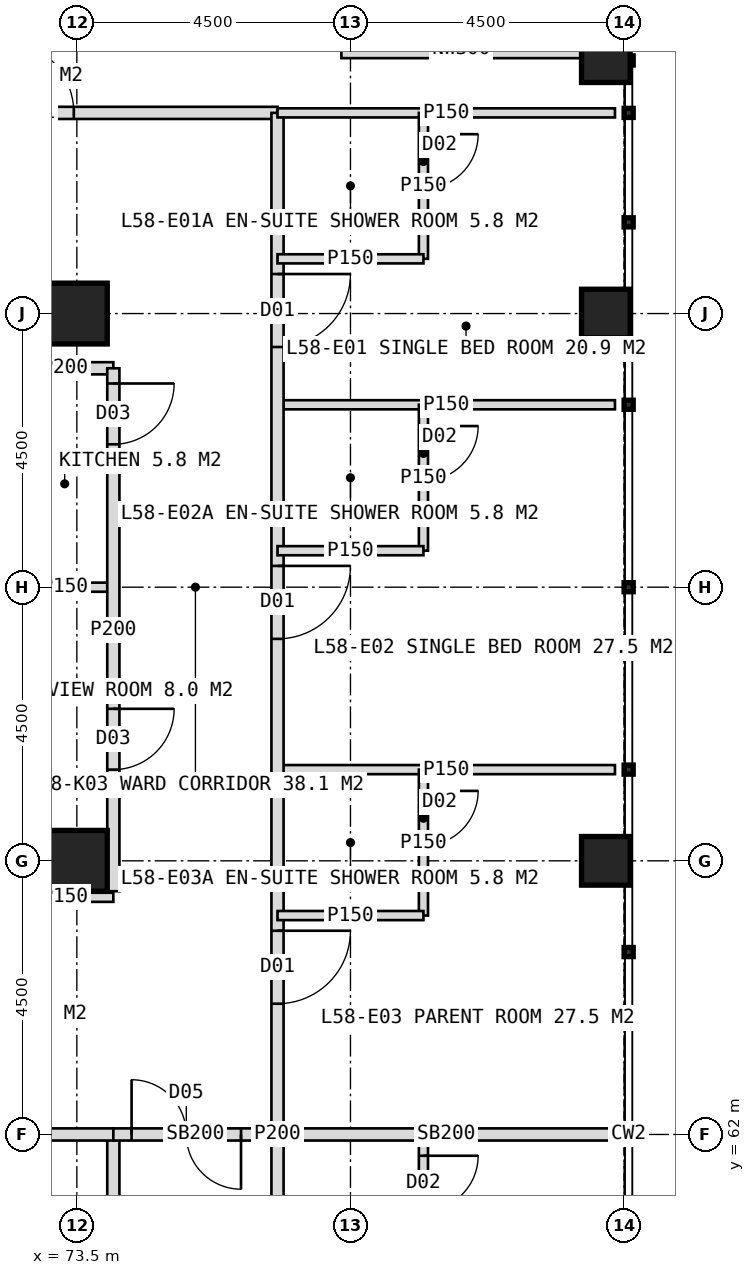
"""IFC4 building model, lengths in metres.
Left out: names, types, materials, properties, quantities, classifications, styles, units other than length and angle.
Written with IfcOpenShell. Run it as: python <this file> out.ifc"""

import sys

from ifc_helpers import new_model, si_unit, direction, frame, frame_2d, origin, origin_2d, place, context, subcontext, project, spatial, rectangle, hollow_rectangle, extrude, element, fill, save


model = new_model("IFC4")
c1 = context("Model", 3, precision=1e-05, world=origin(), true_north=direction((0.0, 1.0)))
c2 = subcontext(c1, "Body", "Model", "MODEL_VIEW")
j1 = project(units=[si_unit("LENGTHUNIT", "METRE"), si_unit("PLANEANGLEUNIT", "RADIAN")], contexts=[c1])
p1 = place(None, origin())
s1 = spatial("IfcSite", under=j1, at=p1, CompositionType="ELEMENT")
p2 = place(p1, origin())
s2 = spatial("IfcBuilding", under=s1, at=p2, CompositionType="ELEMENT")
p3 = place(p2, frame((0.0, 0.0, 241.0)))
s3 = spatial("IfcBuildingStorey", under=s2, at=p3, CompositionType="ELEMENT", Elevation=241.0)
for number, where, z_axis, x_axis in (
    (1, (73.5, 75.5, 0.0), (0.0, 0.0, 1.0), (1.0, 0.0, 0.0)),
    (2, (73.5, 66.5, 0.0), (0.0, 0.0, 1.0), (1.0, 0.0, 0.0)),
):
    element("IfcColumn", number, at=place(p3, frame(where, z_axis=z_axis, x_axis=x_axis)), inside=s3, PredefinedType="COLUMN", context=c2, shape_type="SweptSolid", body=[
        extrude(hollow_rectangle(XDim=1.0, YDim=1.0, WallThickness=0.1, at=origin_2d()), origin(), (0.0, 0.0, 1.0), 4.0),
    ])
for number, where, z_axis, x_axis in (
    (3, (82.2, 66.5, 0.0), (0.0, 0.0, 1.0), (1.0, 0.0, 0.0)),
    (4, (82.2, 75.5, 0.0), (0.0, 0.0, 1.0), (1.0, 0.0, 0.0)),
    (5, (82.2, 79.7, 0.0), (0.0, 0.0, 1.0), (1.0, 0.0, 0.0)),
):
    element("IfcColumn", number, at=place(p3, frame(where, z_axis=z_axis, x_axis=x_axis)), inside=s3, PredefinedType="COLUMN", context=c2, shape_type="SweptSolid", body=[
        extrude(hollow_rectangle(XDim=0.8, YDim=0.8, WallThickness=0.08, at=origin_2d()), origin(), (0.0, 0.0, 1.0), 4.0),
    ])
p4 = place(p3, frame((77.85, 79.85, 0.0), z_axis=(0.0, 0.0, 1.0), x_axis=(1.0, 0.0, 0.0)))
e6 = element("IfcWall", 6, at=p4, inside=s3, PredefinedType="ELEMENTEDWALL", context=c2, shape_type="SweptSolid", body=[
    extrude(rectangle(XDim=3.95, YDim=0.3, at=frame_2d((1.975, 0.0))), origin(), (0.0, 0.0, 1.0), 2.95),
])
p5 = place(p3, frame((43.2, 78.8, 0.0), z_axis=(0.0, 0.0, 1.0), x_axis=(1.0, 0.0, 0.0)))
e7 = element("IfcWall", 7, at=p5, inside=s3, PredefinedType="PARTITIONING", context=c2, shape_type="SweptSolid", body=[
    extrude(rectangle(XDim=33.6, YDim=0.2, at=frame_2d((16.8, 0.0))), origin(), (0.0, 0.0, 1.0), 3.75),
])
p6 = place(p5, frame((3.4, 0.0, 0.0)))
e8 = element("IfcOpeningElement", 8, at=p6, cuts=e7, PredefinedType="OPENING", context=c2, shape_type="SweptSolid", body=[
    extrude(rectangle(XDim=1.0, YDim=2.1, at=frame_2d((0.5, 1.05))), frame((0.0, 0.11, 0.0), z_axis=(0.0, -1.0, 0.0), x_axis=(1.0, 0.0, 0.0)), (0.0, 0.0, 1.0), 0.22),
])
p7 = place(p5, frame((11.05, 0.0, 0.0)))
e9 = element("IfcOpeningElement", 9, at=p7, cuts=e7, PredefinedType="OPENING", context=c2, shape_type="SweptSolid", body=[
    extrude(rectangle(XDim=1.2, YDim=2.2, at=frame_2d((0.6, 1.1))), frame((0.0, 0.11, 0.0), z_axis=(0.0, -1.0, 0.0), x_axis=(1.0, 0.0, 0.0)), (0.0, 0.0, 1.0), 0.22),
])
p8 = place(p5, frame((20.05, 0.0, 0.0)))
e10 = element("IfcOpeningElement", 10, at=p8, cuts=e7, PredefinedType="OPENING", context=c2, shape_type="SweptSolid", body=[
    extrude(rectangle(XDim=1.2, YDim=2.2, at=frame_2d((0.6, 1.1))), frame((0.0, 0.11, 0.0), z_axis=(0.0, -1.0, 0.0), x_axis=(1.0, 0.0, 0.0)), (0.0, 0.0, 1.0), 0.22),
])
p9 = place(p5, frame((29.05, 0.0, 0.0)))
e11 = element("IfcOpeningElement", 11, at=p9, cuts=e7, PredefinedType="OPENING", context=c2, shape_type="SweptSolid", body=[
    extrude(rectangle(XDim=1.2, YDim=2.2, at=frame_2d((0.6, 1.1))), frame((0.0, 0.11, 0.0), z_axis=(0.0, -1.0, 0.0), x_axis=(1.0, 0.0, 0.0)), (0.0, 0.0, 1.0), 0.22),
])
p10 = place(p3, frame((72.5, 74.6, 0.0), z_axis=(0.0, 0.0, 1.0), x_axis=(1.0, 0.0, 0.0)))
e12 = element("IfcWall", 12, at=p10, inside=s3, PredefinedType="PARTITIONING", context=c2, shape_type="SweptSolid", body=[
    extrude(rectangle(XDim=1.6, YDim=0.2, at=frame_2d((0.8, 0.0))), origin(), (0.0, 0.0, 1.0), 3.75),
])
for number, where, z_axis, x_axis in (
    (13, (76.8, 74.0, 0.0), (0.0, 0.0, 1.0), (1.0, 0.0, 0.0)),
    (14, (76.8, 68.0, 0.0), (0.0, 0.0, 1.0), (1.0, 0.0, 0.0)),
):
    element("IfcWall", number, at=place(p3, frame(where, z_axis=z_axis, x_axis=x_axis)), inside=s3, PredefinedType="PARTITIONING", context=c2, shape_type="SweptSolid", body=[
        extrude(rectangle(XDim=5.55, YDim=0.15, at=frame_2d((2.775, 0.0))), origin(), (0.0, 0.0, 1.0), 3.75),
    ])
p11 = place(p3, frame((76.8, 62.0, 0.0), z_axis=(0.0, 0.0, 1.0), x_axis=(1.0, 0.0, 0.0)))
e15 = element("IfcWall", 15, at=p11, inside=s3, PredefinedType="SOLIDWALL", context=c2, shape_type="SweptSolid", body=[
    extrude(rectangle(XDim=5.55, YDim=0.2, at=frame_2d((2.775, 0.0))), origin(), (0.0, 0.0, 1.0), 2.95),
])
p12 = place(p3, frame((76.8, 78.8, 0.0), z_axis=(0.0, 0.0, 1.0), x_axis=(0.0, -1.0, 0.0)))
e16 = element("IfcWall", 16, at=p12, inside=s3, PredefinedType="PARTITIONING", context=c2, shape_type="SweptSolid", body=[
    extrude(rectangle(XDim=33.6, YDim=0.2, at=frame_2d((16.8, 0.0))), origin(), (0.0, 0.0, 1.0), 3.75),
])
p13 = place(p12, frame((2.65, 0.0, 0.0)))
e17 = element("IfcOpeningElement", 17, at=p13, cuts=e16, PredefinedType="OPENING", context=c2, shape_type="SweptSolid", body=[
    extrude(rectangle(XDim=1.2, YDim=2.2, at=frame_2d((0.6, 1.1))), frame((0.0, 0.11, 0.0), z_axis=(0.0, -1.0, 0.0), x_axis=(1.0, 0.0, 0.0)), (0.0, 0.0, 1.0), 0.22),
])
p14 = place(p12, frame((7.45, 0.0, 0.0)))
e18 = element("IfcOpeningElement", 18, at=p14, cuts=e16, PredefinedType="OPENING", context=c2, shape_type="SweptSolid", body=[
    extrude(rectangle(XDim=1.2, YDim=2.2, at=frame_2d((0.6, 1.1))), frame((0.0, 0.11, 0.0), z_axis=(0.0, -1.0, 0.0), x_axis=(1.0, 0.0, 0.0)), (0.0, 0.0, 1.0), 0.22),
])
p15 = place(p12, frame((13.45, 0.0, 0.0)))
e19 = element("IfcOpeningElement", 19, at=p15, cuts=e16, PredefinedType="OPENING", context=c2, shape_type="SweptSolid", body=[
    extrude(rectangle(XDim=1.2, YDim=2.2, at=frame_2d((0.6, 1.1))), frame((0.0, 0.11, 0.0), z_axis=(0.0, -1.0, 0.0), x_axis=(1.0, 0.0, 0.0)), (0.0, 0.0, 1.0), 0.22),
])
p16 = place(p12, frame((20.05, 0.0, 0.0)))
e20 = element("IfcOpeningElement", 20, at=p16, cuts=e16, PredefinedType="OPENING", context=c2, shape_type="SweptSolid", body=[
    extrude(rectangle(XDim=1.2, YDim=2.2, at=frame_2d((0.6, 1.1))), frame((0.0, 0.11, 0.0), z_axis=(0.0, -1.0, 0.0), x_axis=(1.0, 0.0, 0.0)), (0.0, 0.0, 1.0), 0.22),
])
p17 = place(p12, frame((29.05, 0.0, 0.0)))
e21 = element("IfcOpeningElement", 21, at=p17, cuts=e16, PredefinedType="OPENING", context=c2, shape_type="SweptSolid", body=[
    extrude(rectangle(XDim=1.2, YDim=2.2, at=frame_2d((0.6, 1.1))), frame((0.0, 0.11, 0.0), z_axis=(0.0, -1.0, 0.0), x_axis=(1.0, 0.0, 0.0)), (0.0, 0.0, 1.0), 0.22),
])
p18 = place(p3, frame((76.8, 78.8, 0.0), z_axis=(0.0, 0.0, 1.0), x_axis=(1.0, 0.0, 0.0)))
e22 = element("IfcWall", 22, at=p18, inside=s3, PredefinedType="PARTITIONING", context=c2, shape_type="SweptSolid", body=[
    extrude(rectangle(XDim=5.55, YDim=0.15, at=frame_2d((2.775, 0.0))), origin(), (0.0, 0.0, 1.0), 3.75),
])
p19 = place(p3, frame((79.2, 78.8, 0.0), z_axis=(0.0, 0.0, 1.0), x_axis=(0.0, -1.0, 0.0)))
e23 = element("IfcWall", 23, at=p19, inside=s3, PredefinedType="PARTITIONING", context=c2, shape_type="SweptSolid", body=[
    extrude(rectangle(XDim=2.4, YDim=0.15, at=frame_2d((1.2, 0.0))), origin(), (0.0, 0.0, 1.0), 3.75),
])
p20 = place(p19, frame((0.35, 0.0, 0.0)))
e24 = element("IfcOpeningElement", 24, at=p20, cuts=e23, PredefinedType="OPENING", context=c2, shape_type="SweptSolid", body=[
    extrude(rectangle(XDim=0.9, YDim=2.1, at=frame_2d((0.45, 1.05))), frame((0.0, 0.085, 0.0), z_axis=(0.0, -1.0, 0.0), x_axis=(1.0, 0.0, 0.0)), (0.0, 0.0, 1.0), 0.17),
])
p21 = place(p3, frame((76.8, 76.4, 0.0), z_axis=(0.0, 0.0, 1.0), x_axis=(1.0, 0.0, 0.0)))
e25 = element("IfcWall", 25, at=p21, inside=s3, PredefinedType="PARTITIONING", context=c2, shape_type="SweptSolid", body=[
    extrude(rectangle(XDim=2.4, YDim=0.15, at=frame_2d((1.2, 0.0))), origin(), (0.0, 0.0, 1.0), 3.75),
])
p22 = place(p3, frame((79.2, 74.0, 0.0), z_axis=(0.0, 0.0, 1.0), x_axis=(0.0, -1.0, 0.0)))
e26 = element("IfcWall", 26, at=p22, inside=s3, PredefinedType="PARTITIONING", context=c2, shape_type="SweptSolid", body=[
    extrude(rectangle(XDim=2.4, YDim=0.15, at=frame_2d((1.2, 0.0))), origin(), (0.0, 0.0, 1.0), 3.75),
])
p23 = place(p22, frame((0.35, 0.0, 0.0)))
e27 = element("IfcOpeningElement", 27, at=p23, cuts=e26, PredefinedType="OPENING", context=c2, shape_type="SweptSolid", body=[
    extrude(rectangle(XDim=0.9, YDim=2.1, at=frame_2d((0.45, 1.05))), frame((0.0, 0.085, 0.0), z_axis=(0.0, -1.0, 0.0), x_axis=(1.0, 0.0, 0.0)), (0.0, 0.0, 1.0), 0.17),
])
p24 = place(p3, frame((76.8, 71.6, 0.0), z_axis=(0.0, 0.0, 1.0), x_axis=(1.0, 0.0, 0.0)))
e28 = element("IfcWall", 28, at=p24, inside=s3, PredefinedType="PARTITIONING", context=c2, shape_type="SweptSolid", body=[
    extrude(rectangle(XDim=2.4, YDim=0.15, at=frame_2d((1.2, 0.0))), origin(), (0.0, 0.0, 1.0), 3.75),
])
p25 = place(p3, frame((79.2, 68.0, 0.0), z_axis=(0.0, 0.0, 1.0), x_axis=(0.0, -1.0, 0.0)))
e29 = element("IfcWall", 29, at=p25, inside=s3, PredefinedType="PARTITIONING", context=c2, shape_type="SweptSolid", body=[
    extrude(rectangle(XDim=2.4, YDim=0.15, at=frame_2d((1.2, 0.0))), origin(), (0.0, 0.0, 1.0), 3.75),
])
p26 = place(p25, frame((0.35, 0.0, 0.0)))
e30 = element("IfcOpeningElement", 30, at=p26, cuts=e29, PredefinedType="OPENING", context=c2, shape_type="SweptSolid", body=[
    extrude(rectangle(XDim=0.9, YDim=2.1, at=frame_2d((0.45, 1.05))), frame((0.0, 0.085, 0.0), z_axis=(0.0, -1.0, 0.0), x_axis=(1.0, 0.0, 0.0)), (0.0, 0.0, 1.0), 0.17),
])
p27 = place(p3, frame((76.8, 65.6, 0.0), z_axis=(0.0, 0.0, 1.0), x_axis=(1.0, 0.0, 0.0)))
e31 = element("IfcWall", 31, at=p27, inside=s3, PredefinedType="PARTITIONING", context=c2, shape_type="SweptSolid", body=[
    extrude(rectangle(XDim=2.4, YDim=0.15, at=frame_2d((1.2, 0.0))), origin(), (0.0, 0.0, 1.0), 3.75),
])
p28 = place(p3, frame((79.2, 62.0, 0.0), z_axis=(0.0, 0.0, 1.0), x_axis=(0.0, -1.0, 0.0)))
e32 = element("IfcWall", 32, at=p28, inside=s3, PredefinedType="PARTITIONING", context=c2, shape_type="SweptSolid", body=[
    extrude(rectangle(XDim=3.0, YDim=0.15, at=frame_2d((1.5, 0.0))), origin(), (0.0, 0.0, 1.0), 3.75),
])
p29 = place(p28, frame((0.35, 0.0, 0.0)))
e33 = element("IfcOpeningElement", 33, at=p29, cuts=e32, PredefinedType="OPENING", context=c2, shape_type="SweptSolid", body=[
    extrude(rectangle(XDim=0.9, YDim=2.1, at=frame_2d((0.45, 1.05))), frame((0.0, 0.085, 0.0), z_axis=(0.0, -1.0, 0.0), x_axis=(1.0, 0.0, 0.0)), (0.0, 0.0, 1.0), 0.17),
])
p30 = place(p3, frame((72.5, 71.0, 0.0), z_axis=(0.0, 0.0, 1.0), x_axis=(1.0, 0.0, 0.0)))
e34 = element("IfcWall", 34, at=p30, inside=s3, PredefinedType="PARTITIONING", context=c2, shape_type="SweptSolid", body=[
    extrude(rectangle(XDim=1.6, YDim=0.15, at=frame_2d((0.8, 0.0))), origin(), (0.0, 0.0, 1.0), 3.75),
])
p31 = place(p3, frame((74.1, 74.6, 0.0), z_axis=(0.0, 0.0, 1.0), x_axis=(0.0, -1.0, 0.0)))
e35 = element("IfcWall", 35, at=p31, inside=s3, PredefinedType="PARTITIONING", context=c2, shape_type="SweptSolid", body=[
    extrude(rectangle(XDim=8.6, YDim=0.2, at=frame_2d((4.3, 0.0))), origin(), (0.0, 0.0, 1.0), 3.75),
])
p32 = place(p31, frame((0.25, 0.0, 0.0)))
e36 = element("IfcOpeningElement", 36, at=p32, cuts=e35, PredefinedType="OPENING", context=c2, shape_type="SweptSolid", body=[
    extrude(rectangle(XDim=1.0, YDim=2.1, at=frame_2d((0.5, 1.05))), frame((0.0, 0.11, 0.0), z_axis=(0.0, -1.0, 0.0), x_axis=(1.0, 0.0, 0.0)), (0.0, 0.0, 1.0), 0.22),
])
p33 = place(p31, frame((5.6, 0.0, 0.0)))
e37 = element("IfcOpeningElement", 37, at=p33, cuts=e35, PredefinedType="OPENING", context=c2, shape_type="SweptSolid", body=[
    extrude(rectangle(XDim=1.0, YDim=2.1, at=frame_2d((0.5, 1.05))), frame((0.0, 0.11, 0.0), z_axis=(0.0, -1.0, 0.0), x_axis=(1.0, 0.0, 0.0)), (0.0, 0.0, 1.0), 0.22),
])
p34 = place(p3, frame((74.1, 62.0, 0.0), z_axis=(0.0, 0.0, 1.0), x_axis=(0.0, -1.0, 0.0)))
e38 = element("IfcWall", 38, at=p34, inside=s3, PredefinedType="PARTITIONING", context=c2, shape_type="SweptSolid", body=[
    extrude(rectangle(XDim=14.1, YDim=0.2, at=frame_2d((7.05, 0.0))), origin(), (0.0, 0.0, 1.0), 3.75),
])
p35 = place(p34, frame((2.5, 0.0, 0.0)))
e39 = element("IfcOpeningElement", 39, at=p35, cuts=e38, PredefinedType="OPENING", context=c2, shape_type="SweptSolid", body=[
    extrude(rectangle(XDim=1.0, YDim=2.1, at=frame_2d((0.5, 1.05))), frame((0.0, 0.11, 0.0), z_axis=(0.0, -1.0, 0.0), x_axis=(1.0, 0.0, 0.0)), (0.0, 0.0, 1.0), 0.22),
])
p36 = place(p34, frame((7.0, 0.0, 0.0)))
e40 = element("IfcOpeningElement", 40, at=p36, cuts=e38, PredefinedType="OPENING", context=c2, shape_type="SweptSolid", body=[
    extrude(rectangle(XDim=1.0, YDim=2.1, at=frame_2d((0.5, 1.05))), frame((0.0, 0.11, 0.0), z_axis=(0.0, -1.0, 0.0), x_axis=(1.0, 0.0, 0.0)), (0.0, 0.0, 1.0), 0.22),
])
p37 = place(p34, frame((11.05, 0.0, 0.0)))
e41 = element("IfcOpeningElement", 41, at=p37, cuts=e38, PredefinedType="OPENING", context=c2, shape_type="SweptSolid", body=[
    extrude(rectangle(XDim=1.0, YDim=2.1, at=frame_2d((0.5, 1.05))), frame((0.0, 0.11, 0.0), z_axis=(0.0, -1.0, 0.0), x_axis=(1.0, 0.0, 0.0)), (0.0, 0.0, 1.0), 0.22),
])
p38 = place(p3, frame((72.5, 65.9, 0.0), z_axis=(0.0, 0.0, 1.0), x_axis=(1.0, 0.0, 0.0)))
e42 = element("IfcWall", 42, at=p38, inside=s3, PredefinedType="PARTITIONING", context=c2, shape_type="SweptSolid", body=[
    extrude(rectangle(XDim=1.6, YDim=0.15, at=frame_2d((0.8, 0.0))), origin(), (0.0, 0.0, 1.0), 3.75),
])
p39 = place(p3, frame((69.0, 62.0, 0.0), z_axis=(0.0, 0.0, 1.0), x_axis=(1.0, 0.0, 0.0)))
e43 = element("IfcWall", 43, at=p39, inside=s3, PredefinedType="SOLIDWALL", context=c2, shape_type="SweptSolid", body=[
    extrude(rectangle(XDim=5.1, YDim=0.2, at=frame_2d((2.55, 0.0))), origin(), (0.0, 0.0, 1.0), 2.95),
])
p40 = place(p3, frame((74.1, 62.0, 0.0), z_axis=(0.0, 0.0, 1.0), x_axis=(1.0, 0.0, 0.0)))
e44 = element("IfcWall", 44, at=p40, inside=s3, PredefinedType="SOLIDWALL", context=c2, shape_type="SweptSolid", body=[
    extrude(rectangle(XDim=2.7, YDim=0.2, at=frame_2d((1.35, 0.0))), origin(), (0.0, 0.0, 1.0), 2.95),
])
p41 = place(p40, frame((0.3, 0.0, 0.0)))
e45 = element("IfcOpeningElement", 45, at=p41, cuts=e44, PredefinedType="OPENING", context=c2, shape_type="SweptSolid", body=[
    extrude(rectangle(XDim=1.8, YDim=2.2, at=frame_2d((0.9, 1.1))), frame((0.0, 0.11, 0.0), z_axis=(0.0, -1.0, 0.0), x_axis=(1.0, 0.0, 0.0)), (0.0, 0.0, 1.0), 0.22),
])
p42 = place(p9, origin())
e46 = element("IfcDoor", 46, at=p42, inside=s3, OperationType="SINGLE_SWING_LEFT", PredefinedType="DOOR", context=c2, shape_type="SweptSolid", body=[
    extrude(rectangle(XDim=1.2, YDim=2.2, at=frame_2d((0.6, 1.1))), frame((0.0, 0.025, 0.0), z_axis=(0.0, -1.0, 0.0), x_axis=(1.0, 0.0, 0.0)), (0.0, 0.0, 1.0), 0.05),
])
fill(e11, e46)
p43 = place(p32, origin())
e47 = element("IfcDoor", 47, at=p43, inside=s3, OperationType="SINGLE_SWING_LEFT", PredefinedType="DOOR", context=c2, shape_type="SweptSolid", body=[
    extrude(rectangle(XDim=1.0, YDim=2.1, at=frame_2d((0.5, 1.05))), frame((0.0, 0.025, 0.0), z_axis=(0.0, -1.0, 0.0), x_axis=(1.0, 0.0, 0.0)), (0.0, 0.0, 1.0), 0.05),
])
fill(e36, e47)
p44 = place(p13, origin())
e48 = element("IfcDoor", 48, at=p44, inside=s3, OperationType="SINGLE_SWING_LEFT", PredefinedType="DOOR", context=c2, shape_type="SweptSolid", body=[
    extrude(rectangle(XDim=1.2, YDim=2.2, at=frame_2d((0.6, 1.1))), frame((0.0, 0.025, 0.0), z_axis=(0.0, -1.0, 0.0), x_axis=(1.0, 0.0, 0.0)), (0.0, 0.0, 1.0), 0.05),
])
fill(e17, e48)
p45 = place(p20, origin())
e49 = element("IfcDoor", 49, at=p45, inside=s3, OperationType="SINGLE_SWING_LEFT", PredefinedType="DOOR", context=c2, shape_type="SweptSolid", body=[
    extrude(rectangle(XDim=0.9, YDim=2.1, at=frame_2d((0.45, 1.05))), frame((0.0, 0.025, 0.0), z_axis=(0.0, -1.0, 0.0), x_axis=(1.0, 0.0, 0.0)), (0.0, 0.0, 1.0), 0.05),
])
fill(e24, e49)
p46 = place(p14, origin())
e50 = element("IfcDoor", 50, at=p46, inside=s3, OperationType="SINGLE_SWING_LEFT", PredefinedType="DOOR", context=c2, shape_type="SweptSolid", body=[
    extrude(rectangle(XDim=1.2, YDim=2.2, at=frame_2d((0.6, 1.1))), frame((0.0, 0.025, 0.0), z_axis=(0.0, -1.0, 0.0), x_axis=(1.0, 0.0, 0.0)), (0.0, 0.0, 1.0), 0.05),
])
fill(e18, e50)
p47 = place(p23, origin())
e51 = element("IfcDoor", 51, at=p47, inside=s3, OperationType="SINGLE_SWING_LEFT", PredefinedType="DOOR", context=c2, shape_type="SweptSolid", body=[
    extrude(rectangle(XDim=0.9, YDim=2.1, at=frame_2d((0.45, 1.05))), frame((0.0, 0.025, 0.0), z_axis=(0.0, -1.0, 0.0), x_axis=(1.0, 0.0, 0.0)), (0.0, 0.0, 1.0), 0.05),
])
fill(e27, e51)
p48 = place(p15, origin())
e52 = element("IfcDoor", 52, at=p48, inside=s3, OperationType="SINGLE_SWING_LEFT", PredefinedType="DOOR", context=c2, shape_type="SweptSolid", body=[
    extrude(rectangle(XDim=1.2, YDim=2.2, at=frame_2d((0.6, 1.1))), frame((0.0, 0.025, 0.0), z_axis=(0.0, -1.0, 0.0), x_axis=(1.0, 0.0, 0.0)), (0.0, 0.0, 1.0), 0.05),
])
fill(e19, e52)
p49 = place(p26, origin())
e53 = element("IfcDoor", 53, at=p49, inside=s3, OperationType="SINGLE_SWING_LEFT", PredefinedType="DOOR", context=c2, shape_type="SweptSolid", body=[
    extrude(rectangle(XDim=0.9, YDim=2.1, at=frame_2d((0.45, 1.05))), frame((0.0, 0.025, 0.0), z_axis=(0.0, -1.0, 0.0), x_axis=(1.0, 0.0, 0.0)), (0.0, 0.0, 1.0), 0.05),
])
fill(e30, e53)
p50 = place(p29, origin())
e54 = element("IfcDoor", 54, at=p50, inside=s3, OperationType="SINGLE_SWING_LEFT", PredefinedType="DOOR", context=c2, shape_type="SweptSolid", body=[
    extrude(rectangle(XDim=0.9, YDim=2.1, at=frame_2d((0.45, 1.05))), frame((0.0, 0.025, 0.0), z_axis=(0.0, -1.0, 0.0), x_axis=(1.0, 0.0, 0.0)), (0.0, 0.0, 1.0), 0.05),
])
fill(e33, e54)
p51 = place(p33, origin())
e55 = element("IfcDoor", 55, at=p51, inside=s3, OperationType="SINGLE_SWING_LEFT", PredefinedType="DOOR", context=c2, shape_type="SweptSolid", body=[
    extrude(rectangle(XDim=1.0, YDim=2.1, at=frame_2d((0.5, 1.05))), frame((0.0, 0.025, 0.0), z_axis=(0.0, -1.0, 0.0), x_axis=(1.0, 0.0, 0.0)), (0.0, 0.0, 1.0), 0.05),
])
fill(e37, e55)
p52 = place(p41, origin())
e56 = element("IfcDoor", 56, at=p52, inside=s3, OperationType="DOUBLE_DOOR_DOUBLE_SWING", PredefinedType="DOOR", context=c2, shape_type="SweptSolid", body=[
    extrude(rectangle(XDim=1.8, YDim=2.2, at=frame_2d((0.9, 1.1))), frame((0.0, 0.025, 0.0), z_axis=(0.0, -1.0, 0.0), x_axis=(1.0, 0.0, 0.0)), (0.0, 0.0, 1.0), 0.05),
])
fill(e45, e56)
save(model, sys.argv[1])
